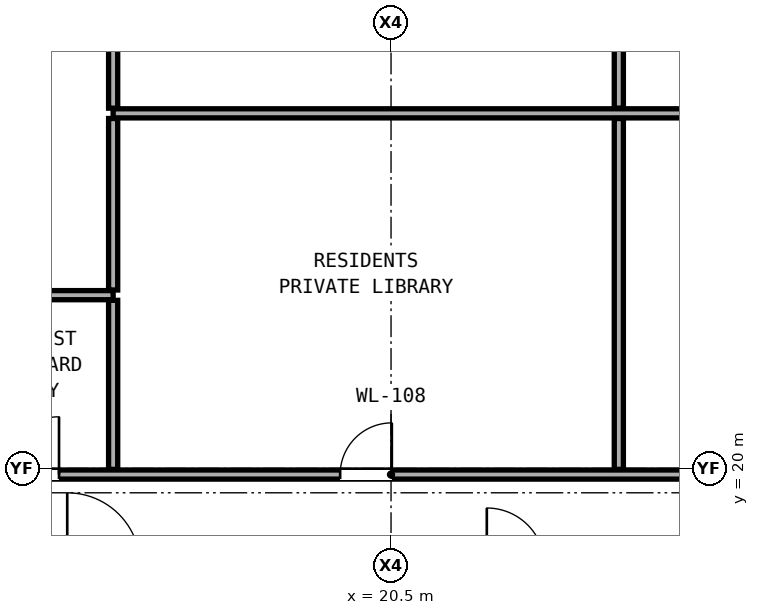
"""IFC4 building model, lengths in metres.
Left out: names, types, materials, properties, quantities, classifications, styles, units other than length and angle.
Written with IfcOpenShell. Run it as: python <this file> out.ifc"""

import sys

from ifc_helpers import new_model, si_unit, direction, frame, frame_2d, origin, place, context, subcontext, project, spatial, rectangle, extrude, element, fill, save


model = new_model("IFC4")
c1 = context("Model", 3, precision=1e-05, world=origin(), true_north=direction((0.0, 1.0)))
c2 = subcontext(c1, "Body", "Model", "MODEL_VIEW")
j1 = project(units=[si_unit("LENGTHUNIT", "METRE"), si_unit("PLANEANGLEUNIT", "RADIAN")], contexts=[c1])
p1 = place(None, origin())
s1 = spatial("IfcSite", under=j1, at=p1, CompositionType="ELEMENT")
p2 = place(p1, origin())
s2 = spatial("IfcBuilding", under=s1, at=p2, CompositionType="ELEMENT")
p3 = place(p2, frame((0.0, 0.0, 177.15)))
s3 = spatial("IfcBuildingStorey", under=s2, at=p3, CompositionType="ELEMENT", Elevation=177.15)
p4 = place(p3, frame((10.22, 19.9, 0.0), z_axis=(0.0, 0.0, 1.0), x_axis=(1.0, 0.0, 0.0)))
e1 = element("IfcWall", 1, at=p4, inside=s3, PredefinedType="PARTITIONING", context=c2, shape_type="SweptSolid", body=[
    extrude(rectangle(XDim=20.56, YDim=0.15, at=frame_2d((10.28, 0.0))), origin(), (0.0, 0.0, 1.0), 2.186),
])
p5 = place(p4, frame((1.66, 0.0, 0.0)))
e2 = element("IfcOpeningElement", 2, at=p5, cuts=e1, PredefinedType="OPENING", context=c2, shape_type="SweptSolid", body=[
    extrude(rectangle(XDim=0.9, YDim=2.1, at=frame_2d((0.45, 1.05))), frame((0.0, 0.085, 0.0), z_axis=(0.0, -1.0, 0.0), x_axis=(1.0, 0.0, 0.0)), (0.0, 0.0, 1.0), 0.17),
])
p6 = place(p4, frame((3.87, 0.0, 0.0)))
e3 = element("IfcOpeningElement", 3, at=p6, cuts=e1, PredefinedType="OPENING", context=c2, shape_type="SweptSolid", body=[
    extrude(rectangle(XDim=0.95, YDim=2.15, at=frame_2d((0.475, 1.075))), frame((0.0, 0.085, 0.0), z_axis=(0.0, -1.0, 0.0), x_axis=(1.0, 0.0, 0.0)), (0.0, 0.0, 1.0), 0.17),
])
p7 = place(p4, frame((9.443, 0.0, 0.0)))
e4 = element("IfcOpeningElement", 4, at=p7, cuts=e1, PredefinedType="OPENING", context=c2, shape_type="SweptSolid", body=[
    extrude(rectangle(XDim=0.85, YDim=2.01, at=frame_2d((0.425, 1.005))), frame((0.0, 0.085, 0.0), z_axis=(0.0, -1.0, 0.0), x_axis=(1.0, 0.0, 0.0)), (0.0, 0.0, 1.0), 0.17),
])
p8 = place(p4, frame((16.848, 0.0, 0.0)))
e5 = element("IfcOpeningElement", 5, at=p8, cuts=e1, PredefinedType="OPENING", context=c2, shape_type="SweptSolid", body=[
    extrude(rectangle(XDim=0.85, YDim=2.01, at=frame_2d((0.425, 1.005))), frame((0.0, 0.085, 0.0), z_axis=(0.0, -1.0, 0.0), x_axis=(1.0, 0.0, 0.0)), (0.0, 0.0, 1.0), 0.17),
])
p9 = place(p3, frame((10.22, 22.85, 0.0), z_axis=(0.0, 0.0, 1.0), x_axis=(1.0, 0.0, 0.0)))
e6 = element("IfcWall", 6, at=p9, inside=s3, PredefinedType="PARTITIONING", context=c2, shape_type="SweptSolid", body=[
    extrude(rectangle(XDim=5.71, YDim=0.15, at=frame_2d((2.855, 0.0))), origin(), (0.0, 0.0, 1.0), 2.186),
])
p10 = place(p3, frame((15.93, 25.84, 0.0), z_axis=(0.0, 0.0, 1.0), x_axis=(1.0, 0.0, 0.0)))
e7 = element("IfcWall", 7, at=p10, inside=s3, PredefinedType="PARTITIONING", context=c2, shape_type="SweptSolid", body=[
    extrude(rectangle(XDim=14.85, YDim=0.15, at=frame_2d((7.425, 0.0))), origin(), (0.0, 0.0, 1.0), 2.186),
])
p11 = place(p3, frame((15.93, 19.985, 0.0), z_axis=(0.0, 0.0, 1.0), x_axis=(0.0, 1.0, 0.0)))
e8 = element("IfcWall", 8, at=p11, inside=s3, PredefinedType="PARTITIONING", context=c2, shape_type="SweptSolid", body=[
    extrude(rectangle(XDim=2.78, YDim=0.15, at=frame_2d((1.39, 0.0))), origin(), (0.0, 0.0, 1.0), 3.05),
])
p12 = place(p3, frame((15.93, 22.935, 0.0), z_axis=(0.0, 0.0, 1.0), x_axis=(0.0, 1.0, 0.0)))
e9 = element("IfcWall", 9, at=p12, inside=s3, PredefinedType="PARTITIONING", context=c2, shape_type="SweptSolid", body=[
    extrude(rectangle(XDim=2.82, YDim=0.15, at=frame_2d((1.41, 0.0))), origin(), (0.0, 0.0, 1.0), 2.186),
])
p13 = place(p3, frame((15.93, 25.925, 0.0), z_axis=(0.0, 0.0, 1.0), x_axis=(0.0, 1.0, 0.0)))
e10 = element("IfcWall", 10, at=p13, inside=s3, PredefinedType="PARTITIONING", context=c2, shape_type="SweptSolid", body=[
    extrude(rectangle(XDim=7.09, YDim=0.15, at=frame_2d((3.545, 0.0))), origin(), (0.0, 0.0, 1.0), 2.186),
])
p14 = place(p3, frame((24.246, 19.985, 0.0), z_axis=(0.0, 0.0, 1.0), x_axis=(0.0, 1.0, 0.0)))
e11 = element("IfcWall", 11, at=p14, inside=s3, PredefinedType="PARTITIONING", context=c2, shape_type="SweptSolid", body=[
    extrude(rectangle(XDim=5.77, YDim=0.15, at=frame_2d((2.885, 0.0))), origin(), (0.0, 0.0, 1.0), 2.186),
])
p15 = place(p3, frame((24.246, 25.925, 0.0), z_axis=(0.0, 0.0, 1.0), x_axis=(0.0, 1.0, 0.0)))
e12 = element("IfcWall", 12, at=p15, inside=s3, PredefinedType="PARTITIONING", context=c2, shape_type="SweptSolid", body=[
    extrude(rectangle(XDim=7.09, YDim=0.15, at=frame_2d((3.545, 0.0))), origin(), (0.0, 0.0, 1.0), 2.186),
])
p16 = place(p6, origin())
e13 = element("IfcDoor", 13, at=p16, inside=s3, OperationType="SINGLE_SWING_RIGHT", PredefinedType="DOOR", context=c2, shape_type="SweptSolid", body=[
    extrude(rectangle(XDim=0.95, YDim=2.15, at=frame_2d((0.475, 1.075))), frame((0.0, 0.025, 0.0), z_axis=(0.0, -1.0, 0.0), x_axis=(1.0, 0.0, 0.0)), (0.0, 0.0, 1.0), 0.05),
])
fill(e3, e13)
p17 = place(p7, origin())
e14 = element("IfcDoor", 14, at=p17, inside=s3, OperationType="SINGLE_SWING_RIGHT", PredefinedType="DOOR", context=c2, shape_type="SweptSolid", body=[
    extrude(rectangle(XDim=0.85, YDim=2.01, at=frame_2d((0.425, 1.005))), frame((0.0, 0.025, 0.0), z_axis=(0.0, -1.0, 0.0), x_axis=(1.0, 0.0, 0.0)), (0.0, 0.0, 1.0), 0.05),
])
fill(e4, e14)
save(model, sys.argv[1])
